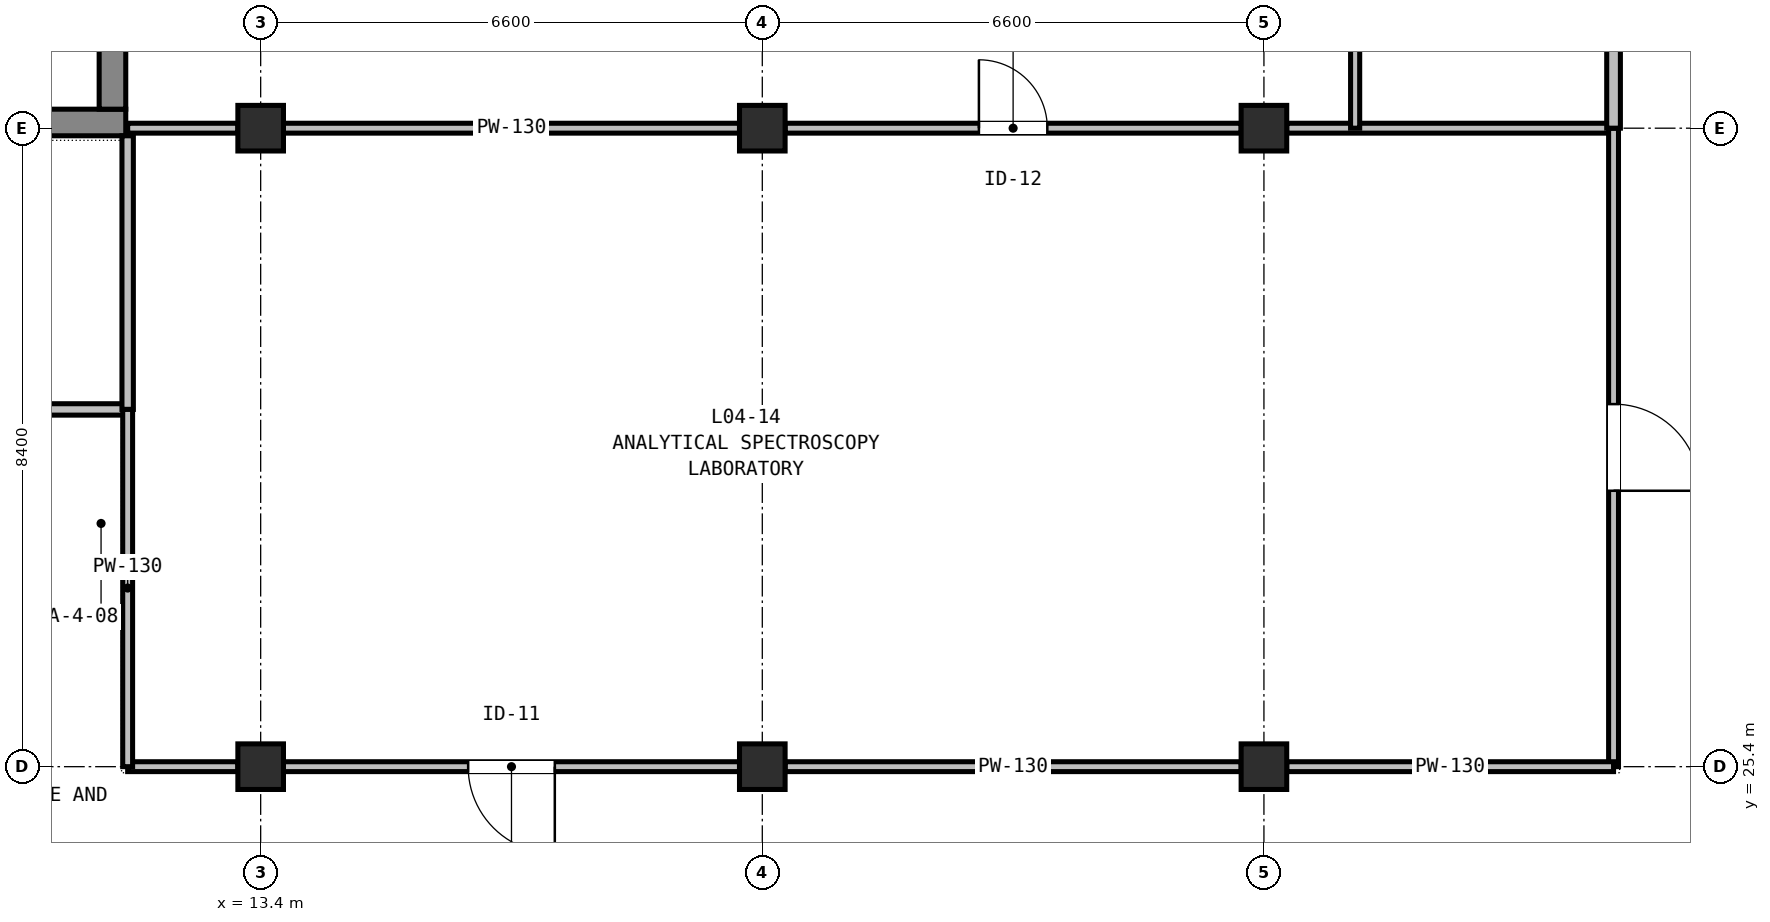
"""IFC4 building model, lengths in metres.
Left out: names, types, materials, properties, quantities, classifications, styles, units other than length and angle.
Written with IfcOpenShell. Run it as: python <this file> out.ifc"""

import sys

from ifc_helpers import new_model, si_unit, direction, frame, frame_2d, origin, origin_2d, place, context, subcontext, project, spatial, rectangle, extrude, element, fill, save


model = new_model("IFC4")
c1 = context("Model", 3, precision=1e-05, world=origin(), true_north=direction((0.0, 1.0)))
c2 = subcontext(c1, "Body", "Model", "MODEL_VIEW")
j1 = project(units=[si_unit("LENGTHUNIT", "METRE"), si_unit("PLANEANGLEUNIT", "RADIAN")], contexts=[c1])
p1 = place(None, origin())
s1 = spatial("IfcSite", under=j1, at=p1, CompositionType="ELEMENT")
p2 = place(p1, origin())
s2 = spatial("IfcBuilding", under=s1, at=p2, CompositionType="ELEMENT")
p3 = place(p2, frame((0.0, 0.0, 19.5)))
s3 = spatial("IfcBuildingStorey", under=s2, at=p3, CompositionType="ELEMENT", Elevation=19.5)
for number, where, z_axis, x_axis in (
    (1, (13.4, 25.4, 0.0), (0.0, 0.0, 1.0), (1.0, 0.0, 0.0)),
    (2, (13.4, 33.8, 0.0), (0.0, 0.0, 1.0), (1.0, 0.0, 0.0)),
    (3, (20.0, 25.4, 0.0), (0.0, 0.0, 1.0), (1.0, 0.0, 0.0)),
    (4, (20.0, 33.8, 0.0), (0.0, 0.0, 1.0), (1.0, 0.0, 0.0)),
    (5, (26.6, 25.4, 0.0), (0.0, 0.0, 1.0), (1.0, 0.0, 0.0)),
    (6, (26.6, 33.8, 0.0), (0.0, 0.0, 1.0), (1.0, 0.0, 0.0)),
):
    element("IfcColumn", number, at=place(p3, frame(where, z_axis=z_axis, x_axis=x_axis)), inside=s3, PredefinedType="COLUMN", context=c2, shape_type="SweptSolid", body=[
        extrude(rectangle(XDim=0.6, YDim=0.6, at=origin_2d()), origin(), (0.0, 0.0, 1.0), 4.5),
    ])
p4 = place(p3, frame((7.875, 33.875, 0.0), z_axis=(0.0, 0.0, 1.0), x_axis=(1.0, 0.0, 0.0)))
e7 = element("IfcWall", 7, at=p4, inside=s3, PredefinedType="SHEAR", context=c2, shape_type="SweptSolid", body=[
    extrude(rectangle(XDim=3.75, YDim=0.35, at=frame_2d((1.875, 0.0))), origin(), (0.0, 0.0, 1.0), 4.5),
])
p5 = place(p4, frame((1.3, 0.0, 0.0)))
e8 = element("IfcOpeningElement", 8, at=p5, cuts=e7, PredefinedType="OPENING", context=c2, shape_type="SweptSolid", body=[
    extrude(rectangle(XDim=1.15, YDim=2.15, at=frame_2d((0.575, 1.075))), frame((0.0, 0.185, 0.0), z_axis=(0.0, -1.0, 0.0), x_axis=(1.0, 0.0, 0.0)), (0.0, 0.0, 1.0), 0.37),
])
p6 = place(p3, frame((11.45, 34.05, 0.0), z_axis=(0.0, 0.0, 1.0), x_axis=(0.0, 1.0, 0.0)))
e9 = element("IfcWall", 9, at=p6, inside=s3, PredefinedType="SHEAR", context=c2, shape_type="SweptSolid", body=[
    extrude(rectangle(XDim=7.275, YDim=0.35, at=frame_2d((3.637, 0.0))), origin(), (0.0, 0.0, 1.0), 4.5),
])
p7 = place(p3, frame((11.65, 30.1, 0.0), z_axis=(0.0, 0.0, 1.0), x_axis=(-1.0, 0.0, 0.0)))
e10 = element("IfcWall", 10, at=p7, inside=s3, PredefinedType="PARTITIONING", context=c2, shape_type="SweptSolid", body=[
    extrude(rectangle(XDim=4.548, YDim=0.15, at=frame_2d((2.274, 0.0))), origin(), (0.0, 0.0, 1.0), 3.985),
])
p8 = place(p7, frame((1.774, 0.0, 0.0)))
e11 = element("IfcOpeningElement", 11, at=p8, cuts=e10, PredefinedType="OPENING", context=c2, shape_type="SweptSolid", body=[
    extrude(rectangle(XDim=1.0, YDim=2.1, at=frame_2d((0.5, 1.05))), frame((0.0, 0.085, 0.0), z_axis=(0.0, -1.0, 0.0), x_axis=(1.0, 0.0, 0.0)), (0.0, 0.0, 1.0), 0.17),
])
p9 = place(p3, frame((11.65, 33.7, 0.0), z_axis=(0.0, 0.0, 1.0), x_axis=(0.0, -1.0, 0.0)))
e12 = element("IfcWall", 12, at=p9, inside=s3, PredefinedType="PARTITIONING", context=c2, shape_type="SweptSolid", body=[
    extrude(rectangle(XDim=3.6, YDim=0.15, at=frame_2d((1.8, 0.0))), origin(), (0.0, 0.0, 1.0), 3.885),
])
p10 = place(p3, frame((11.65, 33.8, 0.0), z_axis=(0.0, 0.0, 1.0), x_axis=(1.0, 0.0, 0.0)))
e13 = element("IfcWall", 13, at=p10, inside=s3, PredefinedType="PARTITIONING", context=c2, shape_type="SweptSolid", body=[
    extrude(rectangle(XDim=1.45, YDim=0.13, at=frame_2d((0.725, 0.0))), origin(), (0.0, 0.0, 1.0), 3.885),
])
p11 = place(p3, frame((13.7, 33.8, 0.0), z_axis=(0.0, 0.0, 1.0), x_axis=(1.0, 0.0, 0.0)))
e14 = element("IfcWall", 14, at=p11, inside=s3, PredefinedType="PARTITIONING", context=c2, shape_type="SweptSolid", body=[
    extrude(rectangle(XDim=6.0, YDim=0.13, at=frame_2d((3.0, 0.0))), origin(), (0.0, 0.0, 1.0), 3.885),
])
p12 = place(p3, frame((20.3, 33.8, 0.0), z_axis=(0.0, 0.0, 1.0), x_axis=(1.0, 0.0, 0.0)))
e15 = element("IfcWall", 15, at=p12, inside=s3, PredefinedType="PARTITIONING", context=c2, shape_type="SweptSolid", body=[
    extrude(rectangle(XDim=6.0, YDim=0.13, at=frame_2d((3.0, 0.0))), origin(), (0.0, 0.0, 1.0), 3.885),
])
p13 = place(p12, frame((2.55, 0.0, 0.0)))
e16 = element("IfcOpeningElement", 16, at=p13, cuts=e15, PredefinedType="OPENING", context=c2, shape_type="SweptSolid", body=[
    extrude(rectangle(XDim=0.9, YDim=2.1, at=frame_2d((0.45, 1.05))), frame((0.0, 0.075, 0.0), z_axis=(0.0, -1.0, 0.0), x_axis=(1.0, 0.0, 0.0)), (0.0, 0.0, 1.0), 0.15),
])
p14 = place(p3, frame((26.9, 33.8, 0.0), z_axis=(0.0, 0.0, 1.0), x_axis=(1.0, 0.0, 0.0)))
e17 = element("IfcWall", 17, at=p14, inside=s3, PredefinedType="PARTITIONING", context=c2, shape_type="SweptSolid", body=[
    extrude(rectangle(XDim=4.3, YDim=0.13, at=frame_2d((2.15, 0.0))), origin(), (0.0, 0.0, 1.0), 3.885),
])
p15 = place(p3, frame((31.2, 33.8, 0.0), z_axis=(0.0, 0.0, 1.0), x_axis=(0.0, -1.0, 0.0)))
e18 = element("IfcWall", 18, at=p15, inside=s3, PredefinedType="PARTITIONING", context=c2, shape_type="SweptSolid", body=[
    extrude(rectangle(XDim=8.4, YDim=0.13, at=frame_2d((4.2, 0.0))), origin(), (0.0, 0.0, 1.0), 3.885),
])
p16 = place(p15, frame((3.63, 0.0, 0.0)))
e19 = element("IfcOpeningElement", 19, at=p16, cuts=e18, PredefinedType="OPENING", context=c2, shape_type="SweptSolid", body=[
    extrude(rectangle(XDim=1.14, YDim=2.06, at=frame_2d((0.57, 1.03))), frame((0.0, 0.075, 0.0), z_axis=(0.0, -1.0, 0.0), x_axis=(1.0, 0.0, 0.0)), (0.0, 0.0, 1.0), 0.15),
])
p17 = place(p3, frame((31.2, 25.4, 0.0), z_axis=(0.0, 0.0, 1.0), x_axis=(-1.0, 0.0, 0.0)))
e20 = element("IfcWall", 20, at=p17, inside=s3, PredefinedType="PARTITIONING", context=c2, shape_type="SweptSolid", body=[
    extrude(rectangle(XDim=4.3, YDim=0.13, at=frame_2d((2.15, 0.0))), origin(), (0.0, 0.0, 1.0), 3.885),
])
p18 = place(p3, frame((26.3, 25.4, 0.0), z_axis=(0.0, 0.0, 1.0), x_axis=(-1.0, 0.0, 0.0)))
e21 = element("IfcWall", 21, at=p18, inside=s3, PredefinedType="PARTITIONING", context=c2, shape_type="SweptSolid", body=[
    extrude(rectangle(XDim=6.0, YDim=0.13, at=frame_2d((3.0, 0.0))), origin(), (0.0, 0.0, 1.0), 3.885),
])
p19 = place(p3, frame((19.7, 25.4, 0.0), z_axis=(0.0, 0.0, 1.0), x_axis=(-1.0, 0.0, 0.0)))
e22 = element("IfcWall", 22, at=p19, inside=s3, PredefinedType="PARTITIONING", context=c2, shape_type="SweptSolid", body=[
    extrude(rectangle(XDim=6.0, YDim=0.13, at=frame_2d((3.0, 0.0))), origin(), (0.0, 0.0, 1.0), 3.885),
])
p20 = place(p19, frame((2.43, 0.0, 0.0)))
e23 = element("IfcOpeningElement", 23, at=p20, cuts=e22, PredefinedType="OPENING", context=c2, shape_type="SweptSolid", body=[
    extrude(rectangle(XDim=1.14, YDim=2.06, at=frame_2d((0.57, 1.03))), frame((0.0, 0.075, 0.0), z_axis=(0.0, -1.0, 0.0), x_axis=(1.0, 0.0, 0.0)), (0.0, 0.0, 1.0), 0.15),
])
p21 = place(p3, frame((13.1, 25.4, 0.0), z_axis=(0.0, 0.0, 1.0), x_axis=(-1.0, 0.0, 0.0)))
e24 = element("IfcWall", 24, at=p21, inside=s3, PredefinedType="PARTITIONING", context=c2, shape_type="SweptSolid", body=[
    extrude(rectangle(XDim=1.45, YDim=0.13, at=frame_2d((0.725, 0.0))), origin(), (0.0, 0.0, 1.0), 3.885),
])
p22 = place(p3, frame((11.65, 25.4, 0.0), z_axis=(0.0, 0.0, 1.0), x_axis=(0.0, 1.0, 0.0)))
e25 = element("IfcWall", 25, at=p22, inside=s3, PredefinedType="PARTITIONING", context=c2, shape_type="SweptSolid", body=[
    extrude(rectangle(XDim=4.7, YDim=0.13, at=frame_2d((2.35, 0.0))), origin(), (0.0, 0.0, 1.0), 3.885),
])
p23 = place(p3, frame((27.8, 41.898, 0.0), z_axis=(0.0, 0.0, 1.0), x_axis=(0.0, -1.0, 0.0)))
e26 = element("IfcWall", 26, at=p23, inside=s3, PredefinedType="PARTITIONING", context=c2, shape_type="SweptSolid", body=[
    extrude(rectangle(XDim=8.098, YDim=0.12, at=frame_2d((4.049, 0.0))), origin(), (0.0, 0.0, 1.0), 3.885),
])
p24 = place(p23, frame((3.599, 0.0, 0.0)))
e27 = element("IfcOpeningElement", 27, at=p24, cuts=e26, PredefinedType="OPENING", context=c2, shape_type="SweptSolid", body=[
    extrude(rectangle(XDim=0.9, YDim=2.1, at=frame_2d((0.45, 1.05))), frame((0.0, 0.07, 0.0), z_axis=(0.0, -1.0, 0.0), x_axis=(1.0, 0.0, 0.0)), (0.0, 0.0, 1.0), 0.14),
])
p25 = place(p3, frame((31.2, 41.898, 0.0), z_axis=(0.0, 0.0, 1.0), x_axis=(0.0, -1.0, 0.0)))
e28 = element("IfcWall", 28, at=p25, inside=s3, PredefinedType="PARTITIONING", context=c2, shape_type="SweptSolid", body=[
    extrude(rectangle(XDim=8.098, YDim=0.18, at=frame_2d((4.049, 0.0))), origin(), (0.0, 0.0, 1.0), 3.885),
])
p26 = place(p25, frame((3.289, 0.0, 0.0)))
e29 = element("IfcOpeningElement", 29, at=p26, cuts=e28, PredefinedType="OPENING", context=c2, shape_type="SweptSolid", body=[
    extrude(rectangle(XDim=1.52, YDim=2.14, at=frame_2d((0.76, 1.07))), frame((0.0, 0.1, 0.0), z_axis=(0.0, -1.0, 0.0), x_axis=(1.0, 0.0, 0.0)), (0.0, 0.0, 1.0), 0.2),
])
p27 = place(p16, origin())
e30 = element("IfcDoor", 30, at=p27, inside=s3, OperationType="SINGLE_SWING_RIGHT", PredefinedType="DOOR", context=c2, shape_type="SweptSolid", body=[
    extrude(rectangle(XDim=1.14, YDim=2.06, at=frame_2d((0.57, 1.03))), frame((0.0, 0.025, 0.0), z_axis=(0.0, -1.0, 0.0), x_axis=(1.0, 0.0, 0.0)), (0.0, 0.0, 1.0), 0.05),
])
fill(e19, e30)
p28 = place(p20, origin())
e31 = element("IfcDoor", 31, at=p28, inside=s3, OperationType="SINGLE_SWING_LEFT", PredefinedType="DOOR", context=c2, shape_type="SweptSolid", body=[
    extrude(rectangle(XDim=1.14, YDim=2.06, at=frame_2d((0.57, 1.03))), frame((0.0, 0.025, 0.0), z_axis=(0.0, -1.0, 0.0), x_axis=(1.0, 0.0, 0.0)), (0.0, 0.0, 1.0), 0.05),
])
fill(e23, e31)
p29 = place(p13, origin())
e32 = element("IfcDoor", 32, at=p29, inside=s3, OperationType="SINGLE_SWING_LEFT", PredefinedType="DOOR", context=c2, shape_type="SweptSolid", body=[
    extrude(rectangle(XDim=0.9, YDim=2.1, at=frame_2d((0.45, 1.05))), frame((0.0, 0.025, 0.0), z_axis=(0.0, -1.0, 0.0), x_axis=(1.0, 0.0, 0.0)), (0.0, 0.0, 1.0), 0.05),
])
fill(e16, e32)
save(model, sys.argv[1])
